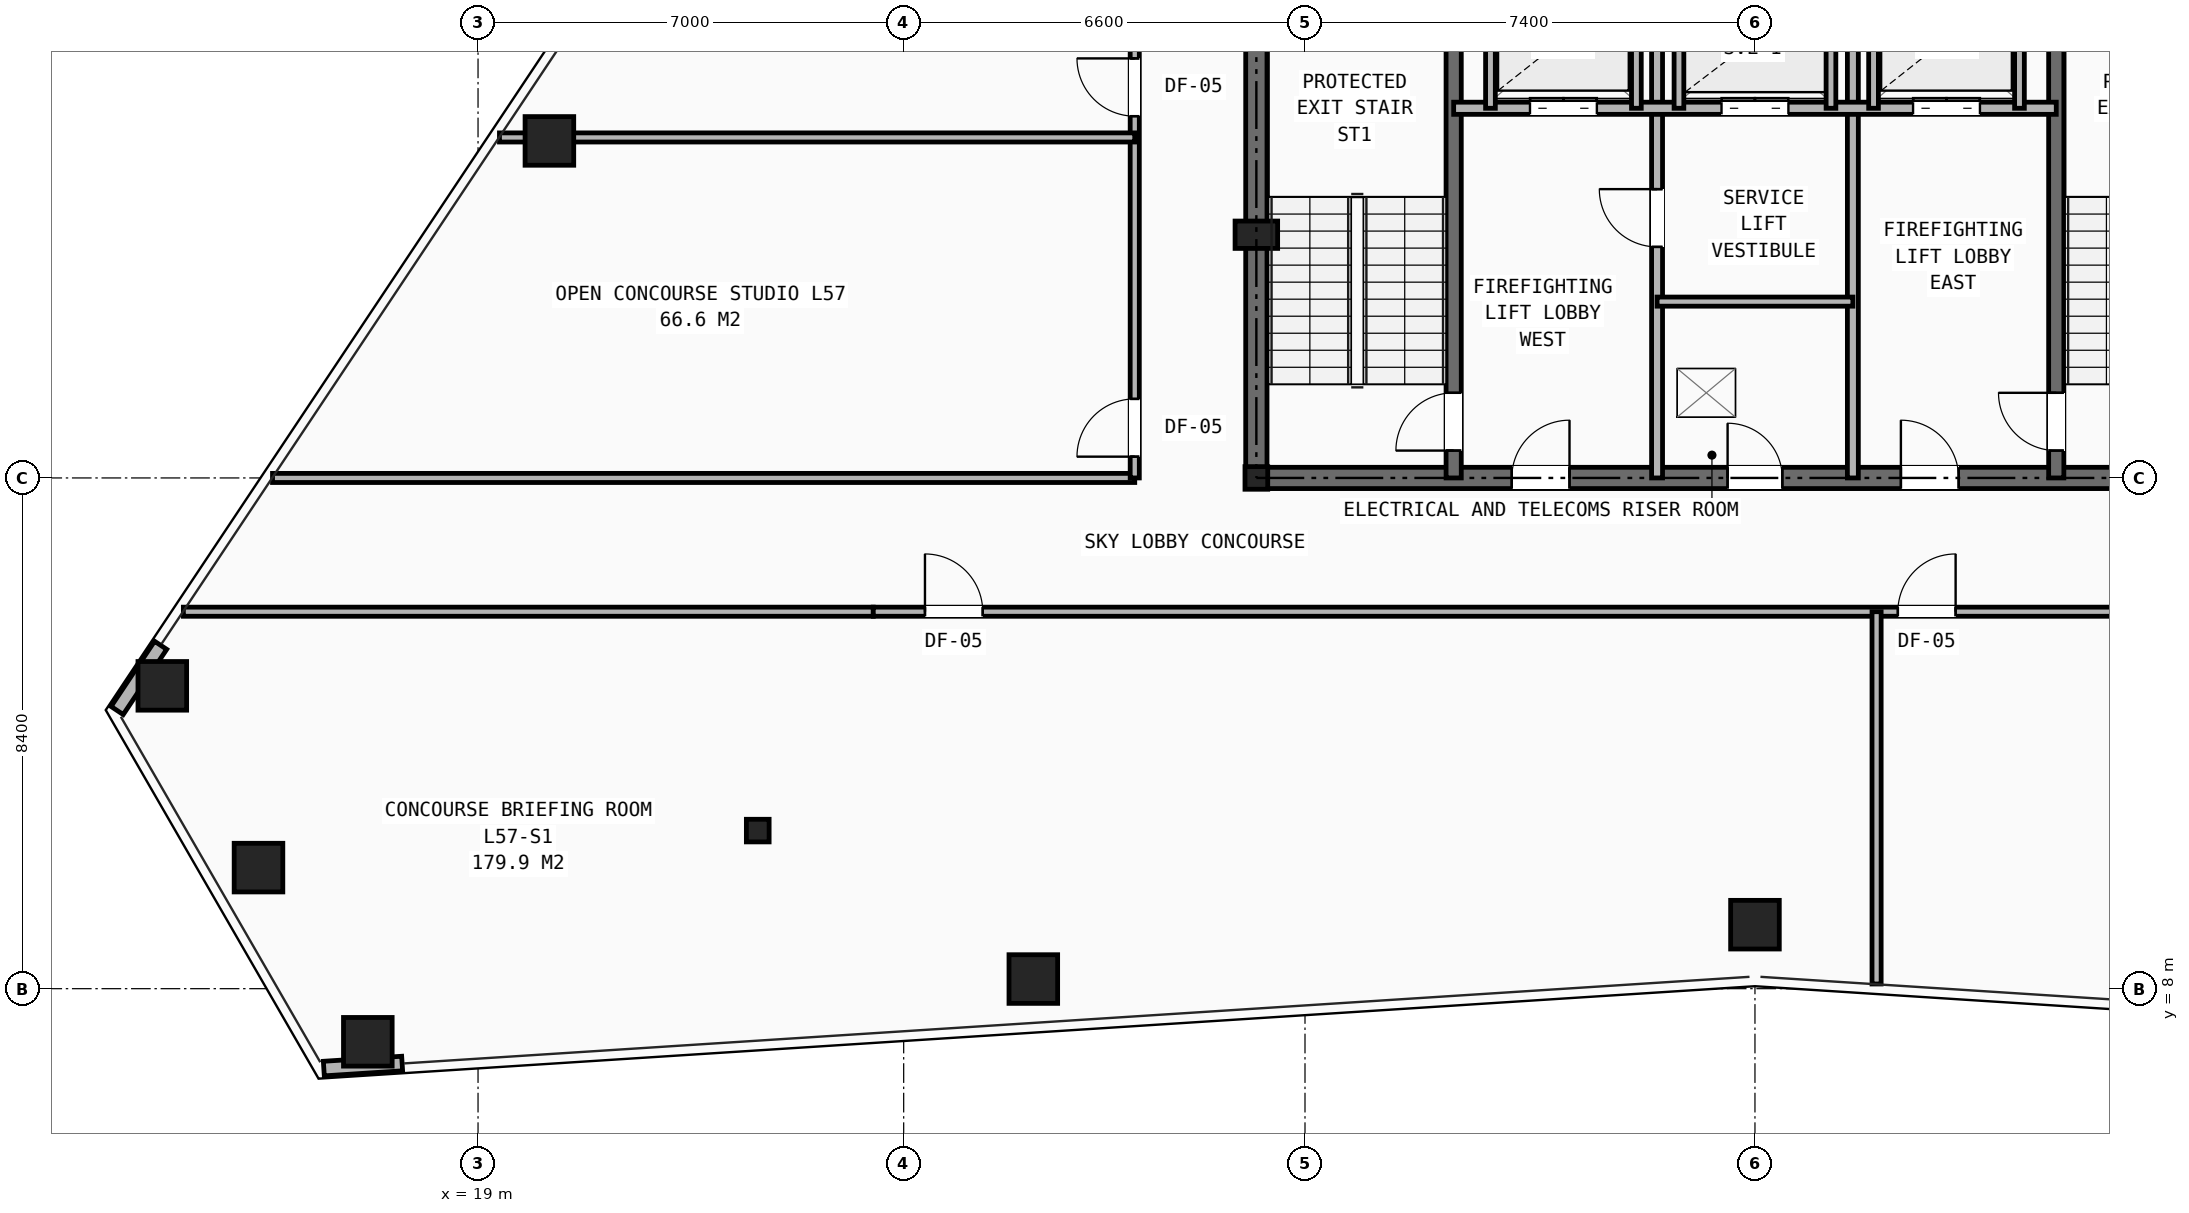
"""IFC4 building model, lengths in metres.
Left out: names, types, materials, properties, quantities, classifications, styles, units other than length and angle.
Written with IfcOpenShell. Run it as: python <this file> out.ifc"""

import sys

from ifc_helpers import new_model, si_unit, direction, frame, frame_2d, origin, origin_2d, place, context, subcontext, project, spatial, rectangle, hollow_rectangle, i_section, extrude, element, fill, save


model = new_model("IFC4")
c1 = context("Model", 3, precision=1e-05, world=origin(), true_north=direction((0.0, 1.0)))
c2 = subcontext(c1, "Body", "Model", "MODEL_VIEW")
j1 = project(units=[si_unit("LENGTHUNIT", "METRE"), si_unit("PLANEANGLEUNIT", "RADIAN")], contexts=[c1])
p1 = place(None, origin())
s1 = spatial("IfcSite", under=j1, at=p1, CompositionType="ELEMENT")
p2 = place(p1, origin())
s2 = spatial("IfcBuilding", under=s1, at=p2, CompositionType="ELEMENT")
p3 = place(p2, frame((0.0, 0.0, 200.7)))
s3 = spatial("IfcBuildingStorey", under=s2, at=p3, CompositionType="ELEMENT", Elevation=200.7)
for number, where, z_axis, x_axis in (
    (1, (31.8, 16.4, 0.0), (0.0, 0.0, 1.0), (1.0, 0.0, 0.0)),
    (2, (23.6, 10.6, 0.0), (0.0, 0.0, 1.0), (1.0, 0.0, 0.0)),
):
    element("IfcColumn", number, at=place(p3, frame(where, z_axis=z_axis, x_axis=x_axis)), inside=s3, PredefinedType="COLUMN", context=c2, shape_type="SweptSolid", body=[
        extrude(i_section(OverallWidth=0.374, OverallDepth=0.372, WebThickness=0.016, FlangeThickness=0.026, at=origin_2d()), origin(), (0.0, 0.0, 1.0), 4.2),
    ])
p4 = place(p3, frame((31.8, 20.4, 0.0), z_axis=(0.0, 0.0, 1.0), x_axis=(1.0, 0.0, 0.0)))
e3 = element("IfcColumn", 3, at=p4, inside=s3, PredefinedType="PILASTER", context=c2, shape_type="SweptSolid", body=[
    extrude(rectangle(XDim=0.7, YDim=0.45, at=origin_2d()), origin(), (0.0, 0.0, 1.0), 4.2),
])
for number, where, z_axis, x_axis in (
    (4, (20.174, 21.943, 0.0), (0.0, 0.0, 1.0), (1.0, 0.0, 0.0)),
    (5, (13.808, 12.981, 0.0), (0.0, 0.0, 1.0), (1.0, 0.0, 0.0)),
    (6, (15.389, 9.991, 0.0), (0.0, 0.0, 1.0), (1.0, 0.0, 0.0)),
    (7, (17.188, 7.126, 0.0), (0.0, 0.0, 1.0), (1.0, 0.0, 0.0)),
    (8, (28.132, 8.158, 0.0), (0.0, 0.0, 1.0), (1.0, 0.0, 0.0)),
    (9, (40.0, 9.052, 0.0), (0.0, 0.0, 1.0), (1.0, 0.0, 0.0)),
):
    element("IfcColumn", number, at=place(p3, frame(where, z_axis=z_axis, x_axis=x_axis)), inside=s3, PredefinedType="COLUMN", context=c2, shape_type="SweptSolid", body=[
        extrude(hollow_rectangle(XDim=0.8, YDim=0.8, WallThickness=0.055, at=origin_2d()), origin(), (0.0, 0.0, 1.0), 4.2),
    ])
p5 = place(p3, frame((13.78, 13.648, 0.0), z_axis=(0.0, 0.0, 1.0), x_axis=(-0.554700196225, -0.832050294338, 0.0)))
e10 = element("IfcWall", 10, at=p5, inside=s3, PredefinedType="SHEAR", context=c2, shape_type="SweptSolid", body=[
    extrude(rectangle(XDim=1.29, YDim=0.24, at=frame_2d((0.645, 0.0))), origin(), (0.0, 0.0, 1.0), 3.323),
])
p6 = place(p3, frame((16.464, 6.686, 0.0), z_axis=(0.0, 0.0, 1.0), x_axis=(0.997929227966, 0.064321504741, 0.0)))
e11 = element("IfcWall", 11, at=p6, inside=s3, PredefinedType="SHEAR", context=c2, shape_type="SweptSolid", body=[
    extrude(rectangle(XDim=1.291, YDim=0.24, at=frame_2d((0.645, 0.0))), origin(), (0.0, 0.0, 1.0), 3.323),
])
p7 = place(p3, frame((31.8, 16.4, 0.0), z_axis=(0.0, 0.0, 1.0), x_axis=(1.0, 0.0, 0.0)))
e12 = element("IfcWall", 12, at=p7, inside=s3, PredefinedType="SHEAR", context=c2, shape_type="SweptSolid", body=[
    extrude(rectangle(XDim=16.4, YDim=0.35, at=frame_2d((8.2, 0.0))), origin(), (0.0, 0.0, 1.0), 3.95),
])
p8 = place(p7, frame((7.75, 0.0, 0.0)))
e13 = element("IfcOpeningElement", 13, at=p8, cuts=e12, PredefinedType="OPENING", context=c2, shape_type="SweptSolid", body=[
    extrude(rectangle(XDim=0.9, YDim=2.1, at=frame_2d((0.45, 1.05))), frame((0.0, 0.185, 0.0), z_axis=(0.0, -1.0, 0.0), x_axis=(1.0, 0.0, 0.0)), (0.0, 0.0, 1.0), 0.37),
])
p9 = place(p7, frame((4.2, 0.0, 0.0)))
e14 = element("IfcOpeningElement", 14, at=p9, cuts=e12, PredefinedType="OPENING", context=c2, shape_type="SweptSolid", body=[
    extrude(rectangle(XDim=0.95, YDim=2.1, at=frame_2d((0.475, 1.05))), frame((0.0, 0.185, 0.0), z_axis=(0.0, -1.0, 0.0), x_axis=(1.0, 0.0, 0.0)), (0.0, 0.0, 1.0), 0.37),
])
p10 = place(p7, frame((10.6, 0.0, 0.0)))
e15 = element("IfcOpeningElement", 15, at=p10, cuts=e12, PredefinedType="OPENING", context=c2, shape_type="SweptSolid", body=[
    extrude(rectangle(XDim=0.95, YDim=2.1, at=frame_2d((0.475, 1.05))), frame((0.0, 0.185, 0.0), z_axis=(0.0, -1.0, 0.0), x_axis=(1.0, 0.0, 0.0)), (0.0, 0.0, 1.0), 0.37),
])
p11 = place(p3, frame((31.8, 16.4, 0.0), z_axis=(0.0, 0.0, 1.0), x_axis=(0.0, 1.0, 0.0)))
e16 = element("IfcWall", 16, at=p11, inside=s3, PredefinedType="SHEAR", context=c2, shape_type="SweptSolid", body=[
    extrude(rectangle(XDim=14.8, YDim=0.35, at=frame_2d((7.4, 0.0))), origin(), (0.0, 0.0, 1.0), 3.95),
])
p12 = place(p11, frame((11.0, 0.0, 0.0)))
e17 = element("IfcOpeningElement", 17, at=p12, cuts=e16, PredefinedType="OPENING", context=c2, shape_type="SweptSolid", body=[
    extrude(rectangle(XDim=1.1, YDim=2.15, at=frame_2d((0.55, 1.075))), frame((0.0, 0.185, 0.0), z_axis=(0.0, -1.0, 0.0), x_axis=(1.0, 0.0, 0.0)), (0.0, 0.0, 1.0), 0.37),
])
p13 = place(p3, frame((35.045, 16.4, 0.0), z_axis=(0.0, 0.0, 1.0), x_axis=(0.0, 1.0, 0.0)))
e18 = element("IfcWall", 18, at=p13, inside=s3, PredefinedType="SHEAR", context=c2, shape_type="SweptSolid", body=[
    extrude(rectangle(XDim=8.4, YDim=0.25, at=frame_2d((4.2, 0.0))), origin(), (0.0, 0.0, 1.0), 3.95),
])
p14 = place(p13, frame((0.45, 0.0, 0.0)))
e19 = element("IfcOpeningElement", 19, at=p14, cuts=e18, PredefinedType="OPENING", context=c2, shape_type="SweptSolid", body=[
    extrude(rectangle(XDim=0.95, YDim=2.1, at=frame_2d((0.475, 1.05))), frame((0.0, 0.135, 0.0), z_axis=(0.0, -1.0, 0.0), x_axis=(1.0, 0.0, 0.0)), (0.0, 0.0, 1.0), 0.27),
])
p15 = place(p3, frame((44.955, 16.4, 0.0), z_axis=(0.0, 0.0, 1.0), x_axis=(0.0, 1.0, 0.0)))
e20 = element("IfcWall", 20, at=p15, inside=s3, PredefinedType="SHEAR", context=c2, shape_type="SweptSolid", body=[
    extrude(rectangle(XDim=8.4, YDim=0.25, at=frame_2d((4.2, 0.0))), origin(), (0.0, 0.0, 1.0), 3.95),
])
p16 = place(p15, frame((0.45, 0.0, 0.0)))
e21 = element("IfcOpeningElement", 21, at=p16, cuts=e20, PredefinedType="OPENING", context=c2, shape_type="SweptSolid", body=[
    extrude(rectangle(XDim=0.95, YDim=2.1, at=frame_2d((0.475, 1.05))), frame((0.0, 0.135, 0.0), z_axis=(0.0, -1.0, 0.0), x_axis=(1.0, 0.0, 0.0)), (0.0, 0.0, 1.0), 0.27),
])
p17 = place(p3, frame((38.39, 16.4, 0.0), z_axis=(0.0, 0.0, 1.0), x_axis=(0.0, 1.0, 0.0)))
e22 = element("IfcWall", 22, at=p17, inside=s3, PredefinedType="PARTITIONING", context=c2, shape_type="SweptSolid", body=[
    extrude(rectangle(XDim=8.4, YDim=0.18, at=frame_2d((4.2, 0.0))), origin(), (0.0, 0.0, 1.0), 3.405),
])
p18 = place(p17, frame((3.8, 0.0, 0.0)))
e23 = element("IfcOpeningElement", 23, at=p18, cuts=e22, PredefinedType="OPENING", context=c2, shape_type="SweptSolid", body=[
    extrude(rectangle(XDim=0.95, YDim=2.1, at=frame_2d((0.475, 1.05))), frame((0.0, 0.1, 0.0), z_axis=(0.0, -1.0, 0.0), x_axis=(1.0, 0.0, 0.0)), (0.0, 0.0, 1.0), 0.2),
])
p19 = place(p3, frame((41.61, 16.4, 0.0), z_axis=(0.0, 0.0, 1.0), x_axis=(0.0, 1.0, 0.0)))
e24 = element("IfcWall", 24, at=p19, inside=s3, PredefinedType="PARTITIONING", context=c2, shape_type="SweptSolid", body=[
    extrude(rectangle(XDim=8.4, YDim=0.18, at=frame_2d((4.2, 0.0))), origin(), (0.0, 0.0, 1.0), 3.405),
])
p20 = place(p3, frame((35.045, 22.48, 0.0), z_axis=(0.0, 0.0, 1.0), x_axis=(1.0, 0.0, 0.0)))
e25 = element("IfcWall", 25, at=p20, inside=s3, PredefinedType="SOLIDWALL", context=c2, shape_type="SweptSolid", body=[
    extrude(rectangle(XDim=9.91, YDim=0.2, at=frame_2d((4.955, 0.0))), origin(), (0.0, 0.0, 1.0), 3.95),
])
p21 = place(p20, frame((1.255, 0.0, 0.0)))
e26 = element("IfcOpeningElement", 26, at=p21, cuts=e25, PredefinedType="OPENING", context=c2, shape_type="SweptSolid", body=[
    extrude(rectangle(XDim=1.1, YDim=2.15, at=frame_2d((0.55, 1.075))), frame((0.0, 0.11, 0.0), z_axis=(0.0, -1.0, 0.0), x_axis=(1.0, 0.0, 0.0)), (0.0, 0.0, 1.0), 0.22),
])
p22 = place(p20, frame((7.555, 0.0, 0.0)))
e27 = element("IfcOpeningElement", 27, at=p22, cuts=e25, PredefinedType="OPENING", context=c2, shape_type="SweptSolid", body=[
    extrude(rectangle(XDim=1.1, YDim=2.15, at=frame_2d((0.55, 1.075))), frame((0.0, 0.11, 0.0), z_axis=(0.0, -1.0, 0.0), x_axis=(1.0, 0.0, 0.0)), (0.0, 0.0, 1.0), 0.22),
])
p23 = place(p20, frame((4.405, 0.0, 0.0)))
e28 = element("IfcOpeningElement", 28, at=p23, cuts=e25, PredefinedType="OPENING", context=c2, shape_type="SweptSolid", body=[
    extrude(rectangle(XDim=1.1, YDim=2.15, at=frame_2d((0.55, 1.075))), frame((0.0, 0.11, 0.0), z_axis=(0.0, -1.0, 0.0), x_axis=(1.0, 0.0, 0.0)), (0.0, 0.0, 1.0), 0.22),
])
p24 = place(p3, frame((38.39, 19.3, 0.0), z_axis=(0.0, 0.0, 1.0), x_axis=(1.0, 0.0, 0.0)))
e29 = element("IfcWall", 29, at=p24, inside=s3, PredefinedType="PARTITIONING", context=c2, shape_type="SweptSolid", body=[
    extrude(rectangle(XDim=3.22, YDim=0.15, at=frame_2d((1.61, 0.0))), origin(), (0.0, 0.0, 1.0), 3.95),
])
for number, where, z_axis, x_axis in (
    (30, (35.65, 22.48, 0.0), (0.0, 0.0, 1.0), (0.0, 1.0, 0.0)),
    (31, (38.05, 22.48, 0.0), (0.0, 0.0, 1.0), (0.0, 1.0, 0.0)),
    (32, (41.95, 22.48, 0.0), (0.0, 0.0, 1.0), (0.0, 1.0, 0.0)),
    (33, (44.35, 22.48, 0.0), (0.0, 0.0, 1.0), (0.0, 1.0, 0.0)),
    (34, (38.75, 22.48, 0.0), (0.0, 0.0, 1.0), (0.0, 1.0, 0.0)),
    (35, (41.25, 22.48, 0.0), (0.0, 0.0, 1.0), (0.0, 1.0, 0.0)),
):
    element("IfcWall", number, at=place(p3, frame(where, z_axis=z_axis, x_axis=x_axis)), inside=s3, PredefinedType="SOLIDWALL", context=c2, shape_type="SweptSolid", body=[
        extrude(rectangle(XDim=2.32, YDim=0.16, at=frame_2d((1.16, 0.0))), origin(), (0.0, 0.0, 1.0), 3.95),
    ])
p25 = place(p3, frame((14.154, 14.2, 0.0), z_axis=(0.0, 0.0, 1.0), x_axis=(1.0, 0.0, 0.0)))
e36 = element("IfcWall", 36, at=p25, inside=s3, PredefinedType="PARTITIONING", context=c2, shape_type="SweptSolid", body=[
    extrude(rectangle(XDim=11.346, YDim=0.15, at=frame_2d((5.673, 0.0))), origin(), (0.0, 0.0, 1.0), 2.965),
])
p26 = place(p3, frame((15.62, 16.4, 0.0), z_axis=(0.0, 0.0, 1.0), x_axis=(1.0, 0.0, 0.0)))
e37 = element("IfcWall", 37, at=p26, inside=s3, PredefinedType="PARTITIONING", context=c2, shape_type="SweptSolid", body=[
    extrude(rectangle(XDim=14.18, YDim=0.15, at=frame_2d((7.09, 0.0))), origin(), (0.0, 0.0, 1.0), 2.965),
])
p27 = place(p3, frame((29.8, 16.4, 0.0), z_axis=(0.0, 0.0, 1.0), x_axis=(0.0, 1.0, 0.0)))
e38 = element("IfcWall", 38, at=p27, inside=s3, PredefinedType="PARTITIONING", context=c2, shape_type="SweptSolid", body=[
    extrude(rectangle(XDim=19.3, YDim=0.15, at=frame_2d((9.65, 0.0))), origin(), (0.0, 0.0, 1.0), 2.965),
])
p28 = place(p27, frame((0.35, 0.0, 0.0)))
e39 = element("IfcOpeningElement", 39, at=p28, cuts=e38, PredefinedType="OPENING", context=c2, shape_type="SweptSolid", body=[
    extrude(rectangle(XDim=0.95, YDim=2.1, at=frame_2d((0.475, 1.05))), frame((0.0, 0.085, 0.0), z_axis=(0.0, -1.0, 0.0), x_axis=(1.0, 0.0, 0.0)), (0.0, 0.0, 1.0), 0.17),
])
p29 = place(p27, frame((5.95, 0.0, 0.0)))
e40 = element("IfcOpeningElement", 40, at=p29, cuts=e38, PredefinedType="OPENING", context=c2, shape_type="SweptSolid", body=[
    extrude(rectangle(XDim=0.95, YDim=2.1, at=frame_2d((0.475, 1.05))), frame((0.0, 0.085, 0.0), z_axis=(0.0, -1.0, 0.0), x_axis=(1.0, 0.0, 0.0)), (0.0, 0.0, 1.0), 0.17),
])
p30 = place(p27, frame((12.95, 0.0, 0.0)))
e41 = element("IfcOpeningElement", 41, at=p30, cuts=e38, PredefinedType="OPENING", context=c2, shape_type="SweptSolid", body=[
    extrude(rectangle(XDim=0.95, YDim=2.1, at=frame_2d((0.475, 1.05))), frame((0.0, 0.085, 0.0), z_axis=(0.0, -1.0, 0.0), x_axis=(1.0, 0.0, 0.0)), (0.0, 0.0, 1.0), 0.17),
])
p31 = place(p3, frame((25.5, 14.2, 0.0), z_axis=(0.0, 0.0, 1.0), x_axis=(1.0, 0.0, 0.0)))
e42 = element("IfcWall", 42, at=p31, inside=s3, PredefinedType="PARTITIONING", context=c2, shape_type="SweptSolid", body=[
    extrude(rectangle(XDim=29.0, YDim=0.15, at=frame_2d((14.5, 0.0))), origin(), (0.0, 0.0, 1.0), 2.965),
])
p32 = place(p31, frame((0.85, 0.0, 0.0)))
e43 = element("IfcOpeningElement", 43, at=p32, cuts=e42, PredefinedType="OPENING", context=c2, shape_type="SweptSolid", body=[
    extrude(rectangle(XDim=0.95, YDim=2.1, at=frame_2d((0.475, 1.05))), frame((0.0, 0.085, 0.0), z_axis=(0.0, -1.0, 0.0), x_axis=(1.0, 0.0, 0.0)), (0.0, 0.0, 1.0), 0.17),
])
p33 = place(p31, frame((16.85, 0.0, 0.0)))
e44 = element("IfcOpeningElement", 44, at=p33, cuts=e42, PredefinedType="OPENING", context=c2, shape_type="SweptSolid", body=[
    extrude(rectangle(XDim=0.95, YDim=2.1, at=frame_2d((0.475, 1.05))), frame((0.0, 0.085, 0.0), z_axis=(0.0, -1.0, 0.0), x_axis=(1.0, 0.0, 0.0)), (0.0, 0.0, 1.0), 0.17),
])
p34 = place(p3, frame((42.0, 8.077, 0.0), z_axis=(0.0, 0.0, 1.0), x_axis=(0.0, 1.0, 0.0)))
e45 = element("IfcWall", 45, at=p34, inside=s3, PredefinedType="PARTITIONING", context=c2, shape_type="SweptSolid", body=[
    extrude(rectangle(XDim=6.123, YDim=0.15, at=frame_2d((3.062, 0.0))), origin(), (0.0, 0.0, 1.0), 3.329),
])
p35 = place(p3, frame((19.352, 22.0, 0.0), z_axis=(0.0, 0.0, 1.0), x_axis=(1.0, 0.0, 0.0)))
e46 = element("IfcWall", 46, at=p35, inside=s3, PredefinedType="PARTITIONING", context=c2, shape_type="SweptSolid", body=[
    extrude(rectangle(XDim=10.448, YDim=0.15, at=frame_2d((5.224, 0.0))), origin(), (0.0, 0.0, 1.0), 2.965),
])
p36 = place(p8, origin())
e47 = element("IfcDoor", 47, at=p36, inside=s3, OperationType="SINGLE_SWING_LEFT", PredefinedType="DOOR", context=c2, shape_type="SweptSolid", body=[
    extrude(rectangle(XDim=0.9, YDim=2.1, at=frame_2d((0.45, 1.05))), frame((0.0, 0.025, 0.0), z_axis=(0.0, -1.0, 0.0), x_axis=(1.0, 0.0, 0.0)), (0.0, 0.0, 1.0), 0.05),
])
fill(e13, e47)
p37 = place(p18, origin())
e48 = element("IfcDoor", 48, at=p37, inside=s3, OperationType="SINGLE_SWING_RIGHT", PredefinedType="DOOR", context=c2, shape_type="SweptSolid", body=[
    extrude(rectangle(XDim=0.95, YDim=2.1, at=frame_2d((0.475, 1.05))), frame((0.0, 0.025, 0.0), z_axis=(0.0, -1.0, 0.0), x_axis=(1.0, 0.0, 0.0)), (0.0, 0.0, 1.0), 0.05),
])
fill(e23, e48)
p38 = place(p14, origin())
e49 = element("IfcDoor", 49, at=p38, inside=s3, OperationType="SINGLE_SWING_LEFT", PredefinedType="DOOR", context=c2, shape_type="SweptSolid", body=[
    extrude(rectangle(XDim=0.95, YDim=2.1, at=frame_2d((0.475, 1.05))), frame((0.0, 0.025, 0.0), z_axis=(0.0, -1.0, 0.0), x_axis=(1.0, 0.0, 0.0)), (0.0, 0.0, 1.0), 0.05),
])
fill(e19, e49)
p39 = place(p16, origin())
e50 = element("IfcDoor", 50, at=p39, inside=s3, OperationType="SINGLE_SWING_RIGHT", PredefinedType="DOOR", context=c2, shape_type="SweptSolid", body=[
    extrude(rectangle(XDim=0.95, YDim=2.1, at=frame_2d((0.475, 1.05))), frame((0.0, 0.025, 0.0), z_axis=(0.0, -1.0, 0.0), x_axis=(1.0, 0.0, 0.0)), (0.0, 0.0, 1.0), 0.05),
])
fill(e21, e50)
p40 = place(p9, origin())
e51 = element("IfcDoor", 51, at=p40, inside=s3, OperationType="SINGLE_SWING_RIGHT", PredefinedType="DOOR", context=c2, shape_type="SweptSolid", body=[
    extrude(rectangle(XDim=0.95, YDim=2.1, at=frame_2d((0.475, 1.05))), frame((0.0, 0.025, 0.0), z_axis=(0.0, -1.0, 0.0), x_axis=(1.0, 0.0, 0.0)), (0.0, 0.0, 1.0), 0.05),
])
fill(e14, e51)
p41 = place(p10, origin())
e52 = element("IfcDoor", 52, at=p41, inside=s3, OperationType="SINGLE_SWING_LEFT", PredefinedType="DOOR", context=c2, shape_type="SweptSolid", body=[
    extrude(rectangle(XDim=0.95, YDim=2.1, at=frame_2d((0.475, 1.05))), frame((0.0, 0.025, 0.0), z_axis=(0.0, -1.0, 0.0), x_axis=(1.0, 0.0, 0.0)), (0.0, 0.0, 1.0), 0.05),
])
fill(e15, e52)
p42 = place(p21, origin())
e53 = element("IfcDoor", 53, at=p42, inside=s3, OperationType="DOUBLE_DOOR_SLIDING", PredefinedType="DOOR", context=c2, shape_type="SweptSolid", body=[
    extrude(rectangle(XDim=1.1, YDim=2.15, at=frame_2d((0.55, 1.075))), frame((0.0, 0.025, 0.0), z_axis=(0.0, -1.0, 0.0), x_axis=(1.0, 0.0, 0.0)), (0.0, 0.0, 1.0), 0.05),
])
fill(e26, e53)
p43 = place(p22, origin())
e54 = element("IfcDoor", 54, at=p43, inside=s3, OperationType="DOUBLE_DOOR_SLIDING", PredefinedType="DOOR", context=c2, shape_type="SweptSolid", body=[
    extrude(rectangle(XDim=1.1, YDim=2.15, at=frame_2d((0.55, 1.075))), frame((0.0, 0.025, 0.0), z_axis=(0.0, -1.0, 0.0), x_axis=(1.0, 0.0, 0.0)), (0.0, 0.0, 1.0), 0.05),
])
fill(e27, e54)
p44 = place(p23, origin())
e55 = element("IfcDoor", 55, at=p44, inside=s3, OperationType="DOUBLE_DOOR_SLIDING", PredefinedType="DOOR", context=c2, shape_type="SweptSolid", body=[
    extrude(rectangle(XDim=1.1, YDim=2.15, at=frame_2d((0.55, 1.075))), frame((0.0, 0.025, 0.0), z_axis=(0.0, -1.0, 0.0), x_axis=(1.0, 0.0, 0.0)), (0.0, 0.0, 1.0), 0.05),
])
fill(e28, e55)
p45 = place(p32, origin())
e56 = element("IfcDoor", 56, at=p45, inside=s3, OperationType="SINGLE_SWING_LEFT", PredefinedType="DOOR", context=c2, shape_type="SweptSolid", body=[
    extrude(rectangle(XDim=0.95, YDim=2.1, at=frame_2d((0.475, 1.05))), frame((0.0, 0.025, 0.0), z_axis=(0.0, -1.0, 0.0), x_axis=(1.0, 0.0, 0.0)), (0.0, 0.0, 1.0), 0.05),
])
fill(e43, e56)
p46 = place(p33, origin())
e57 = element("IfcDoor", 57, at=p46, inside=s3, OperationType="SINGLE_SWING_RIGHT", PredefinedType="DOOR", context=c2, shape_type="SweptSolid", body=[
    extrude(rectangle(XDim=0.95, YDim=2.1, at=frame_2d((0.475, 1.05))), frame((0.0, 0.025, 0.0), z_axis=(0.0, -1.0, 0.0), x_axis=(1.0, 0.0, 0.0)), (0.0, 0.0, 1.0), 0.05),
])
fill(e44, e57)
p47 = place(p28, origin())
e58 = element("IfcDoor", 58, at=p47, inside=s3, OperationType="SINGLE_SWING_LEFT", PredefinedType="DOOR", context=c2, shape_type="SweptSolid", body=[
    extrude(rectangle(XDim=0.95, YDim=2.1, at=frame_2d((0.475, 1.05))), frame((0.0, 0.025, 0.0), z_axis=(0.0, -1.0, 0.0), x_axis=(1.0, 0.0, 0.0)), (0.0, 0.0, 1.0), 0.05),
])
fill(e39, e58)
p48 = place(p29, origin())
e59 = element("IfcDoor", 59, at=p48, inside=s3, OperationType="SINGLE_SWING_RIGHT", PredefinedType="DOOR", context=c2, shape_type="SweptSolid", body=[
    extrude(rectangle(XDim=0.95, YDim=2.1, at=frame_2d((0.475, 1.05))), frame((0.0, 0.025, 0.0), z_axis=(0.0, -1.0, 0.0), x_axis=(1.0, 0.0, 0.0)), (0.0, 0.0, 1.0), 0.05),
])
fill(e40, e59)
save(model, sys.argv[1])
